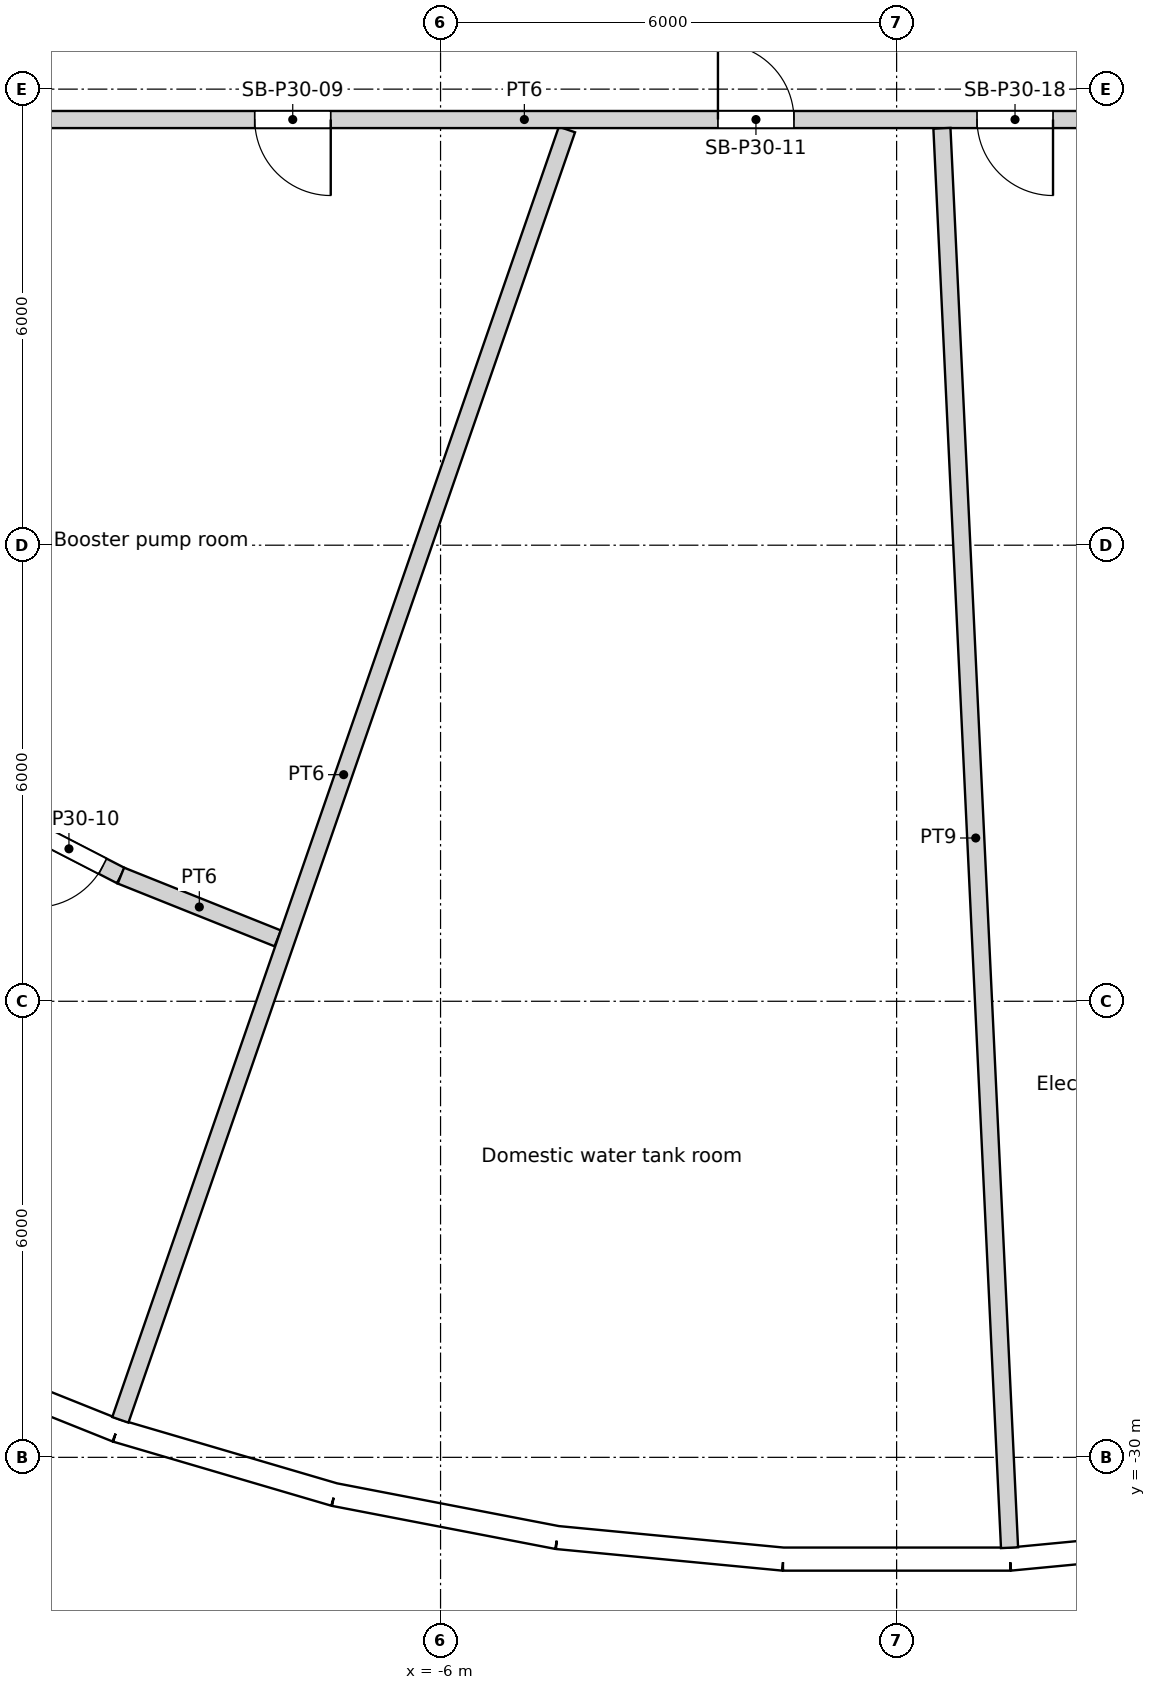
"""IFC4 building model, lengths in metres.
Left out: names, types, materials, properties, quantities, classifications, styles, units other than length and angle.
Written with IfcOpenShell. Run it as: python <this file> out.ifc"""

import sys

from ifc_helpers import new_model, si_unit, direction, frame, frame_2d, origin, origin_2d, place, context, subcontext, project, spatial, rectangle, circle, extrude, element, fill, save


model = new_model("IFC4")
c1 = context("Model", 3, precision=1e-05, world=origin(), true_north=direction((0.0, 1.0)))
c2 = subcontext(c1, "Body", "Model", "MODEL_VIEW")
j1 = project(units=[si_unit("LENGTHUNIT", "METRE"), si_unit("PLANEANGLEUNIT", "RADIAN")], contexts=[c1])
p1 = place(None, origin())
s1 = spatial("IfcSite", under=j1, at=p1, CompositionType="ELEMENT")
p2 = place(p1, origin())
s2 = spatial("IfcBuilding", under=s1, at=p2, CompositionType="ELEMENT")
p3 = place(p2, frame((0.0, 0.0, 120.0)))
s3 = spatial("IfcBuildingStorey", under=s2, at=p3, CompositionType="ELEMENT", Elevation=120.0)
for number, where, z_axis, x_axis in (
    (1, (-9.902, -28.61, 0.0), (0.0, 0.0, 1.0), (1.0, 0.0, 0.0)),
    (2, (-4.309, -29.966, 0.0), (0.0, 0.0, 1.0), (1.0, 0.0, 0.0)),
    (3, (1.44, -30.24, 0.0), (0.0, 0.0, 1.0), (1.0, 0.0, 0.0)),
):
    element("IfcColumn", number, at=place(p3, frame(where, z_axis=z_axis, x_axis=x_axis)), inside=s3, PredefinedType="COLUMN", context=c2, shape_type="SweptSolid", body=[
        extrude(circle(Radius=0.6, at=origin_2d()), origin(), (0.0, 0.0, 1.0), 6.0),
    ])
for number, where, z_axis, x_axis in (
    (4, (-7.04, -23.516, 0.0), (0.0, 0.0, 1.0), (1.0, 0.0, 0.0)),
    (5, (-1.427, -24.506, 0.0), (0.0, 0.0, 1.0), (1.0, 0.0, 0.0)),
):
    element("IfcColumn", number, at=place(p3, frame(where, z_axis=z_axis, x_axis=x_axis)), inside=s3, PredefinedType="COLUMN", context=c2, shape_type="SweptSolid", body=[
        extrude(circle(Radius=0.65, at=origin_2d()), origin(), (0.0, 0.0, 1.0), 6.0),
    ])
for number, where, z_axis, x_axis in (
    (6, (-9.411, -16.301, 0.0), (0.0, 0.0, 1.0), (1.0, 0.0, 0.0)),
    (7, (-4.188, -18.35, 0.0), (0.0, 0.0, 1.0), (1.0, 0.0, 0.0)),
    (8, (1.406, -18.77, 0.0), (0.0, 0.0, 1.0), (1.0, 0.0, 0.0)),
):
    element("IfcColumn", number, at=place(p3, frame(where, z_axis=z_axis, x_axis=x_axis)), inside=s3, PredefinedType="COLUMN", context=c2, shape_type="SweptSolid", body=[
        extrude(circle(Radius=0.7, at=origin_2d()), origin(), (0.0, 0.0, 1.0), 6.0),
    ])
p4 = place(p3, frame((-13.033, -28.539, 0.0), z_axis=(0.0, 0.0, 1.0), x_axis=(0.928380795373, -0.371630325434, 0.0)))
e9 = element("IfcWall", 9, at=p4, inside=s3, PredefinedType="SOLIDWALL", context=c2, shape_type="SweptSolid", body=[
    extrude(rectangle(XDim=2.986, YDim=0.3, at=frame_2d((1.493, 0.0))), origin(), (0.0, 0.0, 1.0), 5.7),
])
p5 = place(p4, frame((1.493, 0.0, 1.8)))
e10 = element("IfcOpeningElement", 10, at=p5, cuts=e9, PredefinedType="OPENING", context=c2, shape_type="SweptSolid", body=[
    extrude(circle(Radius=1.2, at=origin_2d()), frame((0.0, 0.16, 0.0), z_axis=(0.0, -1.0, 0.0), x_axis=(1.0, 0.0, 0.0)), (0.0, 0.0, 1.0), 0.32),
])
p6 = place(p3, frame((-10.261, -29.649, 0.0), z_axis=(0.0, 0.0, 1.0), x_axis=(0.959502108153, -0.281701445593, 0.0)))
e11 = element("IfcWall", 11, at=p6, inside=s3, PredefinedType="SOLIDWALL", context=c2, shape_type="SweptSolid", body=[
    extrude(rectangle(XDim=2.986, YDim=0.3, at=frame_2d((1.493, 0.0))), origin(), (0.0, 0.0, 1.0), 5.7),
])
p7 = place(p6, frame((1.493, 0.0, 1.8)))
e12 = element("IfcOpeningElement", 12, at=p7, cuts=e11, PredefinedType="OPENING", context=c2, shape_type="SweptSolid", body=[
    extrude(circle(Radius=1.2, at=origin_2d()), frame((0.0, 0.16, 0.0), z_axis=(0.0, -1.0, 0.0), x_axis=(1.0, 0.0, 0.0)), (0.0, 0.0, 1.0), 0.32),
])
p8 = place(p3, frame((-7.397, -30.49, 0.0), z_axis=(0.0, 0.0, 1.0), x_axis=(0.981918853666, -0.189302310646, 0.0)))
e13 = element("IfcWall", 13, at=p8, inside=s3, PredefinedType="SOLIDWALL", context=c2, shape_type="SweptSolid", body=[
    extrude(rectangle(XDim=2.986, YDim=0.3, at=frame_2d((1.493, 0.0))), origin(), (0.0, 0.0, 1.0), 5.7),
])
p9 = place(p8, frame((1.493, 0.0, 1.8)))
e14 = element("IfcOpeningElement", 14, at=p9, cuts=e13, PredefinedType="OPENING", context=c2, shape_type="SweptSolid", body=[
    extrude(circle(Radius=1.2, at=origin_2d()), frame((0.0, 0.16, 0.0), z_axis=(0.0, -1.0, 0.0), x_axis=(1.0, 0.0, 0.0)), (0.0, 0.0, 1.0), 0.32),
])
p10 = place(p3, frame((-4.465, -31.055, 0.0), z_axis=(0.0, 0.0, 1.0), x_axis=(0.99547560533, -0.095017467833, 0.0)))
e15 = element("IfcWall", 15, at=p10, inside=s3, PredefinedType="SOLIDWALL", context=c2, shape_type="SweptSolid", body=[
    extrude(rectangle(XDim=2.986, YDim=0.3, at=frame_2d((1.493, 0.0))), origin(), (0.0, 0.0, 1.0), 5.7),
])
p11 = place(p10, frame((1.493, 0.0, 1.8)))
e16 = element("IfcOpeningElement", 16, at=p11, cuts=e15, PredefinedType="OPENING", context=c2, shape_type="SweptSolid", body=[
    extrude(circle(Radius=1.2, at=origin_2d()), frame((0.0, 0.16, 0.0), z_axis=(0.0, -1.0, 0.0), x_axis=(1.0, 0.0, 0.0)), (0.0, 0.0, 1.0), 0.32),
])
p12 = place(p3, frame((-1.493, -31.339, 0.0), z_axis=(0.0, 0.0, 1.0), x_axis=(1.0, 0.0, 0.0)))
e17 = element("IfcWall", 17, at=p12, inside=s3, PredefinedType="SOLIDWALL", context=c2, shape_type="SweptSolid", body=[
    extrude(rectangle(XDim=2.986, YDim=0.3, at=frame_2d((1.493, 0.0))), origin(), (0.0, 0.0, 1.0), 5.7),
])
p13 = place(p12, frame((1.493, 0.0, 1.8)))
e18 = element("IfcOpeningElement", 18, at=p13, cuts=e17, PredefinedType="OPENING", context=c2, shape_type="SweptSolid", body=[
    extrude(circle(Radius=1.2, at=origin_2d()), frame((0.0, 0.16, 0.0), z_axis=(0.0, -1.0, 0.0), x_axis=(1.0, 0.0, 0.0)), (0.0, 0.0, 1.0), 0.32),
])
p14 = place(p3, frame((1.493, -31.339, 0.0), z_axis=(0.0, 0.0, 1.0), x_axis=(0.99547560533, 0.095017467833, 0.0)))
e19 = element("IfcWall", 19, at=p14, inside=s3, PredefinedType="SOLIDWALL", context=c2, shape_type="SweptSolid", body=[
    extrude(rectangle(XDim=2.986, YDim=0.3, at=frame_2d((1.493, 0.0))), origin(), (0.0, 0.0, 1.0), 5.7),
])
p15 = place(p14, frame((1.493, 0.0, 1.8)))
e20 = element("IfcOpeningElement", 20, at=p15, cuts=e19, PredefinedType="OPENING", context=c2, shape_type="SweptSolid", body=[
    extrude(circle(Radius=1.2, at=origin_2d()), frame((0.0, 0.16, 0.0), z_axis=(0.0, -1.0, 0.0), x_axis=(1.0, 0.0, 0.0)), (0.0, 0.0, 1.0), 0.32),
])
p16 = place(p3, frame((-10.205, -22.347, 0.0), z_axis=(0.0, 0.0, 1.0), x_axis=(-0.888845697941, 0.458206640339, 0.0)))
e21 = element("IfcWall", 21, at=p16, inside=s3, PredefinedType="PARTITIONING", context=c2, shape_type="SweptSolid", body=[
    extrude(rectangle(XDim=2.338, YDim=0.225, at=frame_2d((1.169, 0.0))), origin(), (0.0, 0.0, 1.0), 5.2),
])
p17 = place(p16, frame((0.269, 0.0, 0.0)))
e22 = element("IfcOpeningElement", 22, at=p17, cuts=e21, PredefinedType="OPENING", context=c2, shape_type="SweptSolid", body=[
    extrude(rectangle(XDim=1.0, YDim=2.1, at=frame_2d((0.5, 1.05))), frame((0.0, 0.113, 0.0), z_axis=(0.0, -1.0, 0.0), x_axis=(1.0, 0.0, 0.0)), (0.0, 0.0, 1.0), 0.225),
])
p18 = place(p3, frame((-11.71, -12.4, 0.0), z_axis=(0.0, 0.0, 1.0), x_axis=(1.0, 0.0, 0.0)))
e23 = element("IfcWall", 23, at=p18, inside=s3, PredefinedType="PARTITIONING", context=c2, shape_type="SweptSolid", body=[
    extrude(rectangle(XDim=14.12, YDim=0.225, at=frame_2d((7.06, 0.0))), origin(), (0.0, 0.0, 1.0), 5.2),
])
p19 = place(p18, frame((3.265, 0.0, 0.0)))
e24 = element("IfcOpeningElement", 24, at=p19, cuts=e23, PredefinedType="OPENING", context=c2, shape_type="SweptSolid", body=[
    extrude(rectangle(XDim=1.0, YDim=2.1, at=frame_2d((0.5, 1.05))), frame((0.0, 0.113, 0.0), z_axis=(0.0, -1.0, 0.0), x_axis=(1.0, 0.0, 0.0)), (0.0, 0.0, 1.0), 0.225),
])
p20 = place(p18, frame((9.36, 0.0, 0.0)))
e25 = element("IfcOpeningElement", 25, at=p20, cuts=e23, PredefinedType="OPENING", context=c2, shape_type="SweptSolid", body=[
    extrude(rectangle(XDim=1.0, YDim=2.1, at=frame_2d((0.5, 1.05))), frame((0.0, 0.113, 0.0), z_axis=(0.0, -1.0, 0.0), x_axis=(1.0, 0.0, 0.0)), (0.0, 0.0, 1.0), 0.225),
])
p21 = place(p18, frame((12.768, 0.0, 0.0)))
e26 = element("IfcOpeningElement", 26, at=p21, cuts=e23, PredefinedType="OPENING", context=c2, shape_type="SweptSolid", body=[
    extrude(rectangle(XDim=1.0, YDim=2.1, at=frame_2d((0.5, 1.05))), frame((0.0, 0.113, 0.0), z_axis=(0.0, -1.0, 0.0), x_axis=(1.0, 0.0, 0.0)), (0.0, 0.0, 1.0), 0.225),
])
p22 = place(p3, frame((-10.212, -29.507, 0.0), z_axis=(0.0, 0.0, 1.0), x_axis=(0.32706855335, 0.945000614502, 0.0)))
e27 = element("IfcWall", 27, at=p22, inside=s3, PredefinedType="PARTITIONING", context=c2, shape_type="SweptSolid", body=[
    extrude(rectangle(XDim=17.964, YDim=0.225, at=frame_2d((8.982, 0.0))), origin(), (0.0, 0.0, 1.0), 5.2),
])
p23 = place(p3, frame((-10.205, -22.347, 0.0), z_axis=(0.0, 0.0, 1.0), x_axis=(0.92837816823, -0.371636888312, 0.0)))
e28 = element("IfcWall", 28, at=p23, inside=s3, PredefinedType="PARTITIONING", context=c2, shape_type="SweptSolid", body=[
    extrude(rectangle(XDim=2.222, YDim=0.225, at=frame_2d((1.111, 0.0))), origin(), (0.0, 0.0, 1.0), 5.2),
])
p24 = place(p3, frame((1.486, -31.189, 0.0), z_axis=(0.0, 0.0, 1.0), x_axis=(-0.047574456268, 0.998867694498, 0.0)))
e29 = element("IfcWall", 29, at=p24, inside=s3, PredefinedType="PARTITIONING", context=c2, shape_type="SweptSolid", body=[
    extrude(rectangle(XDim=18.695, YDim=0.225, at=frame_2d((9.348, 0.0))), origin(), (0.0, 0.0, 1.0), 2.7),
])
p25 = place(p5, origin())
e30 = element("IfcWindow", 30, at=p25, inside=s3, PartitioningType="SINGLE_PANEL", PredefinedType="WINDOW", context=c2, shape_type="SweptSolid", body=[
    extrude(circle(Radius=1.2, at=origin_2d()), frame((0.0, 0.12, 0.0), z_axis=(0.0, -1.0, 0.0), x_axis=(1.0, 0.0, 0.0)), (0.0, 0.0, 1.0), 0.1),
])
fill(e10, e30)
p26 = place(p7, origin())
e31 = element("IfcWindow", 31, at=p26, inside=s3, PartitioningType="SINGLE_PANEL", PredefinedType="WINDOW", context=c2, shape_type="SweptSolid", body=[
    extrude(circle(Radius=1.2, at=origin_2d()), frame((0.0, 0.12, 0.0), z_axis=(0.0, -1.0, 0.0), x_axis=(1.0, 0.0, 0.0)), (0.0, 0.0, 1.0), 0.1),
])
fill(e12, e31)
p27 = place(p9, origin())
e32 = element("IfcWindow", 32, at=p27, inside=s3, PartitioningType="SINGLE_PANEL", PredefinedType="WINDOW", context=c2, shape_type="SweptSolid", body=[
    extrude(circle(Radius=1.2, at=origin_2d()), frame((0.0, 0.12, 0.0), z_axis=(0.0, -1.0, 0.0), x_axis=(1.0, 0.0, 0.0)), (0.0, 0.0, 1.0), 0.1),
])
fill(e14, e32)
p28 = place(p11, origin())
e33 = element("IfcWindow", 33, at=p28, inside=s3, PartitioningType="SINGLE_PANEL", PredefinedType="WINDOW", context=c2, shape_type="SweptSolid", body=[
    extrude(circle(Radius=1.2, at=origin_2d()), frame((0.0, 0.12, 0.0), z_axis=(0.0, -1.0, 0.0), x_axis=(1.0, 0.0, 0.0)), (0.0, 0.0, 1.0), 0.1),
])
fill(e16, e33)
p29 = place(p13, origin())
e34 = element("IfcWindow", 34, at=p29, inside=s3, PartitioningType="SINGLE_PANEL", PredefinedType="WINDOW", context=c2, shape_type="SweptSolid", body=[
    extrude(circle(Radius=1.2, at=origin_2d()), frame((0.0, 0.12, 0.0), z_axis=(0.0, -1.0, 0.0), x_axis=(1.0, 0.0, 0.0)), (0.0, 0.0, 1.0), 0.1),
])
fill(e18, e34)
p30 = place(p15, origin())
e35 = element("IfcWindow", 35, at=p30, inside=s3, PartitioningType="SINGLE_PANEL", PredefinedType="WINDOW", context=c2, shape_type="SweptSolid", body=[
    extrude(circle(Radius=1.2, at=origin_2d()), frame((0.0, 0.12, 0.0), z_axis=(0.0, -1.0, 0.0), x_axis=(1.0, 0.0, 0.0)), (0.0, 0.0, 1.0), 0.1),
])
fill(e20, e35)
p31 = place(p19, origin())
e36 = element("IfcDoor", 36, at=p31, inside=s3, OperationType="SINGLE_SWING_LEFT", PredefinedType="DOOR", context=c2, shape_type="SweptSolid", body=[
    extrude(rectangle(XDim=1.0, YDim=2.1, at=frame_2d((0.5, 1.05))), frame((0.0, 0.025, 0.0), z_axis=(0.0, -1.0, 0.0), x_axis=(1.0, 0.0, 0.0)), (0.0, 0.0, 1.0), 0.05),
])
fill(e24, e36)
p32 = place(p17, origin())
e37 = element("IfcDoor", 37, at=p32, inside=s3, OperationType="SINGLE_SWING_RIGHT", PredefinedType="DOOR", context=c2, shape_type="SweptSolid", body=[
    extrude(rectangle(XDim=1.0, YDim=2.1, at=frame_2d((0.5, 1.05))), frame((0.0, 0.025, 0.0), z_axis=(0.0, -1.0, 0.0), x_axis=(1.0, 0.0, 0.0)), (0.0, 0.0, 1.0), 0.05),
])
fill(e22, e37)
p33 = place(p20, origin())
e38 = element("IfcDoor", 38, at=p33, inside=s3, OperationType="SINGLE_SWING_LEFT", PredefinedType="DOOR", context=c2, shape_type="SweptSolid", body=[
    extrude(rectangle(XDim=1.0, YDim=2.1, at=frame_2d((0.5, 1.05))), frame((0.0, 0.025, 0.0), z_axis=(0.0, -1.0, 0.0), x_axis=(1.0, 0.0, 0.0)), (0.0, 0.0, 1.0), 0.05),
])
fill(e25, e38)
p34 = place(p21, origin())
e39 = element("IfcDoor", 39, at=p34, inside=s3, OperationType="SINGLE_SWING_LEFT", PredefinedType="DOOR", context=c2, shape_type="SweptSolid", body=[
    extrude(rectangle(XDim=1.0, YDim=2.1, at=frame_2d((0.5, 1.05))), frame((0.0, 0.025, 0.0), z_axis=(0.0, -1.0, 0.0), x_axis=(1.0, 0.0, 0.0)), (0.0, 0.0, 1.0), 0.05),
])
fill(e26, e39)
save(model, sys.argv[1])
